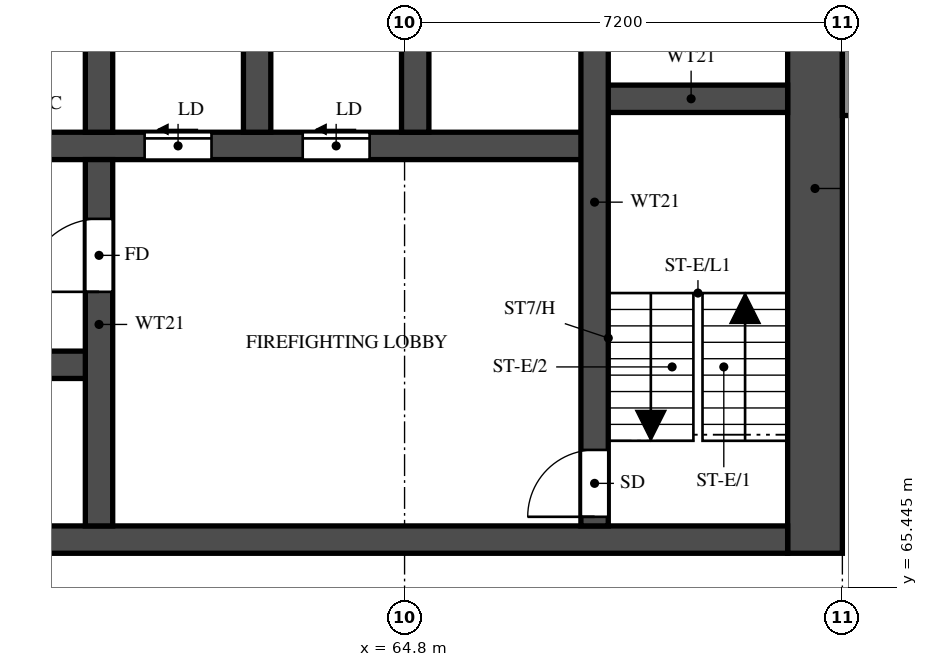
"""IFC4 building model, lengths in metres.
Left out: names, types, materials, properties, quantities, classifications, styles, units other than length and angle.
Written with IfcOpenShell. Run it as: python <this file> out.ifc"""

import sys

from ifc_helpers import new_model, si_unit, direction, frame, frame_2d, origin, place, context, subcontext, project, spatial, rectangle, extrude, element, fill, save


model = new_model("IFC4")
c1 = context("Model", 3, precision=1e-05, world=origin(), true_north=direction((0.0, 1.0)))
c2 = subcontext(c1, "Body", "Model", "MODEL_VIEW")
j1 = project(units=[si_unit("LENGTHUNIT", "METRE"), si_unit("PLANEANGLEUNIT", "RADIAN")], contexts=[c1])
p1 = place(None, origin())
s1 = spatial("IfcSite", under=j1, at=p1, CompositionType="ELEMENT")
p2 = place(p1, origin())
s2 = spatial("IfcBuilding", under=s1, at=p2, CompositionType="ELEMENT")
p3 = place(p2, frame((0.0, 0.0, 76.0)))
s3 = spatial("IfcBuildingStorey", under=s2, at=p3, CompositionType="ELEMENT", Elevation=76.0)
p4 = place(p3, frame((71.55, 66.0, 0.0), z_axis=(0.0, 0.0, 1.0), x_axis=(0.0, 1.0, 0.0)))
e1 = element("IfcWall", 1, at=p4, inside=s3, PredefinedType="SHEAR", context=c2, shape_type="SweptSolid", body=[
    extrude(rectangle(XDim=12.0, YDim=0.9, at=frame_2d((6.0, 0.0))), origin(), (0.0, 0.0, 1.0), 3.18),
])
p5 = place(p3, frame((29.7, 66.225, 0.0), z_axis=(0.0, 0.0, 1.0), x_axis=(1.0, 0.0, 0.0)))
e2 = element("IfcWall", 2, at=p5, inside=s3, PredefinedType="SHEAR", context=c2, shape_type="SweptSolid", body=[
    extrude(rectangle(XDim=41.4, YDim=0.45, at=frame_2d((20.7, 0.0))), origin(), (0.0, 0.0, 1.0), 3.18),
])
p6 = place(p5, frame((0.925, 0.0, 0.0)))
e3 = element("IfcOpeningElement", 3, at=p6, cuts=e2, PredefinedType="OPENING", context=c2, shape_type="SweptSolid", body=[
    extrude(rectangle(XDim=1.1, YDim=2.1, at=frame_2d((0.55, 1.05))), frame((0.0, 0.235, 0.0), z_axis=(0.0, -1.0, 0.0), x_axis=(1.0, 0.0, 0.0)), (0.0, 0.0, 1.0), 0.47),
])
p7 = place(p5, frame((3.738, 0.0, 0.0)))
e4 = element("IfcOpeningElement", 4, at=p7, cuts=e2, PredefinedType="OPENING", context=c2, shape_type="SweptSolid", body=[
    extrude(rectangle(XDim=1.8, YDim=2.1, at=frame_2d((0.9, 1.05))), frame((0.0, 0.235, 0.0), z_axis=(0.0, -1.0, 0.0), x_axis=(1.0, 0.0, 0.0)), (0.0, 0.0, 1.0), 0.47),
])
p8 = place(p3, frame((35.575, 69.1, 0.0), z_axis=(0.0, 0.0, 1.0), x_axis=(1.0, 0.0, 0.0)))
e5 = element("IfcWall", 5, at=p8, inside=s3, PredefinedType="SHEAR", context=c2, shape_type="SweptSolid", body=[
    extrude(rectangle(XDim=24.2, YDim=0.45, at=frame_2d((12.1, 0.0))), origin(), (0.0, 0.0, 1.0), 3.18),
])
p9 = place(p8, frame((1.05, 0.0, 0.0)))
e6 = element("IfcOpeningElement", 6, at=p9, cuts=e5, PredefinedType="OPENING", context=c2, shape_type="SweptSolid", body=[
    extrude(rectangle(XDim=1.1, YDim=2.1, at=frame_2d((0.55, 1.05))), frame((0.0, 0.235, 0.0), z_axis=(0.0, -1.0, 0.0), x_axis=(1.0, 0.0, 0.0)), (0.0, 0.0, 1.0), 0.47),
])
p10 = place(p8, frame((3.8, 0.0, 0.0)))
e7 = element("IfcOpeningElement", 7, at=p10, cuts=e5, PredefinedType="OPENING", context=c2, shape_type="SweptSolid", body=[
    extrude(rectangle(XDim=1.1, YDim=2.1, at=frame_2d((0.55, 1.05))), frame((0.0, 0.235, 0.0), z_axis=(0.0, -1.0, 0.0), x_axis=(1.0, 0.0, 0.0)), (0.0, 0.0, 1.0), 0.47),
])
p11 = place(p8, frame((6.55, 0.0, 0.0)))
e8 = element("IfcOpeningElement", 8, at=p11, cuts=e5, PredefinedType="OPENING", context=c2, shape_type="SweptSolid", body=[
    extrude(rectangle(XDim=1.1, YDim=2.1, at=frame_2d((0.55, 1.05))), frame((0.0, 0.235, 0.0), z_axis=(0.0, -1.0, 0.0), x_axis=(1.0, 0.0, 0.0)), (0.0, 0.0, 1.0), 0.47),
])
p12 = place(p8, frame((9.3, 0.0, 0.0)))
e9 = element("IfcOpeningElement", 9, at=p12, cuts=e5, PredefinedType="OPENING", context=c2, shape_type="SweptSolid", body=[
    extrude(rectangle(XDim=1.1, YDim=2.1, at=frame_2d((0.55, 1.05))), frame((0.0, 0.235, 0.0), z_axis=(0.0, -1.0, 0.0), x_axis=(1.0, 0.0, 0.0)), (0.0, 0.0, 1.0), 0.47),
])
p13 = place(p8, frame((12.05, 0.0, 0.0)))
e10 = element("IfcOpeningElement", 10, at=p13, cuts=e5, PredefinedType="OPENING", context=c2, shape_type="SweptSolid", body=[
    extrude(rectangle(XDim=1.1, YDim=2.1, at=frame_2d((0.55, 1.05))), frame((0.0, 0.235, 0.0), z_axis=(0.0, -1.0, 0.0), x_axis=(1.0, 0.0, 0.0)), (0.0, 0.0, 1.0), 0.47),
])
p14 = place(p8, frame((14.8, 0.0, 0.0)))
e11 = element("IfcOpeningElement", 11, at=p14, cuts=e5, PredefinedType="OPENING", context=c2, shape_type="SweptSolid", body=[
    extrude(rectangle(XDim=1.1, YDim=2.1, at=frame_2d((0.55, 1.05))), frame((0.0, 0.235, 0.0), z_axis=(0.0, -1.0, 0.0), x_axis=(1.0, 0.0, 0.0)), (0.0, 0.0, 1.0), 0.47),
])
p15 = place(p3, frame((32.875, 72.7, 0.0), z_axis=(0.0, 0.0, 1.0), x_axis=(1.0, 0.0, 0.0)))
e12 = element("IfcWall", 12, at=p15, inside=s3, PredefinedType="SHEAR", context=c2, shape_type="SweptSolid", body=[
    extrude(rectangle(XDim=35.05, YDim=0.45, at=frame_2d((17.525, 0.0))), origin(), (0.0, 0.0, 1.0), 3.18),
])
p16 = place(p15, frame((19.8, 0.0, 0.0)))
e13 = element("IfcOpeningElement", 13, at=p16, cuts=e12, PredefinedType="OPENING", context=c2, shape_type="SweptSolid", body=[
    extrude(rectangle(XDim=1.1, YDim=2.1, at=frame_2d((0.55, 1.05))), frame((0.0, 0.235, 0.0), z_axis=(0.0, -1.0, 0.0), x_axis=(1.0, 0.0, 0.0)), (0.0, 0.0, 1.0), 0.47),
])
p17 = place(p15, frame((27.65, 0.0, 0.0)))
e14 = element("IfcOpeningElement", 14, at=p17, cuts=e12, PredefinedType="OPENING", context=c2, shape_type="SweptSolid", body=[
    extrude(rectangle(XDim=1.1, YDim=2.1, at=frame_2d((0.55, 1.05))), frame((0.0, 0.235, 0.0), z_axis=(0.0, -1.0, 0.0), x_axis=(1.0, 0.0, 0.0)), (0.0, 0.0, 1.0), 0.47),
])
p18 = place(p15, frame((30.25, 0.0, 0.0)))
e15 = element("IfcOpeningElement", 15, at=p18, cuts=e12, PredefinedType="OPENING", context=c2, shape_type="SweptSolid", body=[
    extrude(rectangle(XDim=1.1, YDim=2.1, at=frame_2d((0.55, 1.05))), frame((0.0, 0.235, 0.0), z_axis=(0.0, -1.0, 0.0), x_axis=(1.0, 0.0, 0.0)), (0.0, 0.0, 1.0), 0.47),
])
p19 = place(p15, frame((3.75, 0.0, 0.0)))
e16 = element("IfcOpeningElement", 16, at=p19, cuts=e12, PredefinedType="OPENING", context=c2, shape_type="SweptSolid", body=[
    extrude(rectangle(XDim=1.1, YDim=2.1, at=frame_2d((0.55, 1.05))), frame((0.0, 0.235, 0.0), z_axis=(0.0, -1.0, 0.0), x_axis=(1.0, 0.0, 0.0)), (0.0, 0.0, 1.0), 0.47),
])
p20 = place(p15, frame((6.5, 0.0, 0.0)))
e17 = element("IfcOpeningElement", 17, at=p20, cuts=e12, PredefinedType="OPENING", context=c2, shape_type="SweptSolid", body=[
    extrude(rectangle(XDim=1.1, YDim=2.1, at=frame_2d((0.55, 1.05))), frame((0.0, 0.235, 0.0), z_axis=(0.0, -1.0, 0.0), x_axis=(1.0, 0.0, 0.0)), (0.0, 0.0, 1.0), 0.47),
])
p21 = place(p15, frame((9.25, 0.0, 0.0)))
e18 = element("IfcOpeningElement", 18, at=p21, cuts=e12, PredefinedType="OPENING", context=c2, shape_type="SweptSolid", body=[
    extrude(rectangle(XDim=1.1, YDim=2.1, at=frame_2d((0.55, 1.05))), frame((0.0, 0.235, 0.0), z_axis=(0.0, -1.0, 0.0), x_axis=(1.0, 0.0, 0.0)), (0.0, 0.0, 1.0), 0.47),
])
p22 = place(p15, frame((12.0, 0.0, 0.0)))
e19 = element("IfcOpeningElement", 19, at=p22, cuts=e12, PredefinedType="OPENING", context=c2, shape_type="SweptSolid", body=[
    extrude(rectangle(XDim=1.1, YDim=2.1, at=frame_2d((0.55, 1.05))), frame((0.0, 0.235, 0.0), z_axis=(0.0, -1.0, 0.0), x_axis=(1.0, 0.0, 0.0)), (0.0, 0.0, 1.0), 0.47),
])
p23 = place(p15, frame((14.75, 0.0, 0.0)))
e20 = element("IfcOpeningElement", 20, at=p23, cuts=e12, PredefinedType="OPENING", context=c2, shape_type="SweptSolid", body=[
    extrude(rectangle(XDim=1.1, YDim=2.1, at=frame_2d((0.55, 1.05))), frame((0.0, 0.235, 0.0), z_axis=(0.0, -1.0, 0.0), x_axis=(1.0, 0.0, 0.0)), (0.0, 0.0, 1.0), 0.47),
])
p24 = place(p15, frame((17.5, 0.0, 0.0)))
e21 = element("IfcOpeningElement", 21, at=p24, cuts=e12, PredefinedType="OPENING", context=c2, shape_type="SweptSolid", body=[
    extrude(rectangle(XDim=1.1, YDim=2.1, at=frame_2d((0.55, 1.05))), frame((0.0, 0.235, 0.0), z_axis=(0.0, -1.0, 0.0), x_axis=(1.0, 0.0, 0.0)), (0.0, 0.0, 1.0), 0.47),
])
p25 = place(p15, frame((0.913, 0.0, 0.0)))
e22 = element("IfcOpeningElement", 22, at=p25, cuts=e12, PredefinedType="OPENING", context=c2, shape_type="SweptSolid", body=[
    extrude(rectangle(XDim=1.1, YDim=2.1, at=frame_2d((0.55, 1.05))), frame((0.0, 0.235, 0.0), z_axis=(0.0, -1.0, 0.0), x_axis=(1.0, 0.0, 0.0)), (0.0, 0.0, 1.0), 0.47),
])
p26 = place(p3, frame((67.925, 73.475, 0.0), z_axis=(0.0, 0.0, 1.0), x_axis=(1.0, 0.0, 0.0)))
e23 = element("IfcWall", 23, at=p26, inside=s3, PredefinedType="SHEAR", context=c2, shape_type="SweptSolid", body=[
    extrude(rectangle(XDim=3.175, YDim=0.45, at=frame_2d((1.587, 0.0))), origin(), (0.0, 0.0, 1.0), 3.18),
])
p27 = place(p3, frame((67.925, 66.45, 0.0), z_axis=(0.0, 0.0, 1.0), x_axis=(0.0, 1.0, 0.0)))
e24 = element("IfcWall", 24, at=p27, inside=s3, PredefinedType="SHEAR", context=c2, shape_type="SweptSolid", body=[
    extrude(rectangle(XDim=10.65, YDim=0.45, at=frame_2d((5.325, 0.0))), origin(), (0.0, 0.0, 1.0), 3.18),
])
p28 = place(p27, frame((0.15, 0.0, 0.0)))
e25 = element("IfcOpeningElement", 25, at=p28, cuts=e24, PredefinedType="OPENING", context=c2, shape_type="SweptSolid", body=[
    extrude(rectangle(XDim=1.1, YDim=2.1, at=frame_2d((0.55, 1.05))), frame((0.0, 0.235, 0.0), z_axis=(0.0, -1.0, 0.0), x_axis=(1.0, 0.0, 0.0)), (0.0, 0.0, 1.0), 0.47),
])
p29 = place(p3, frame((59.775, 66.45, 0.0), z_axis=(0.0, 0.0, 1.0), x_axis=(0.0, 1.0, 0.0)))
e26 = element("IfcWall", 26, at=p29, inside=s3, PredefinedType="SHEAR", context=c2, shape_type="SweptSolid", body=[
    extrude(rectangle(XDim=6.025, YDim=0.45, at=frame_2d((3.013, 0.0))), origin(), (0.0, 0.0, 1.0), 3.18),
])
p30 = place(p29, frame((3.85, 0.0, 0.0)))
e27 = element("IfcOpeningElement", 27, at=p30, cuts=e26, PredefinedType="OPENING", context=c2, shape_type="SweptSolid", body=[
    extrude(rectangle(XDim=1.2, YDim=2.1, at=frame_2d((0.6, 1.05))), frame((0.0, 0.235, 0.0), z_axis=(0.0, -1.0, 0.0), x_axis=(1.0, 0.0, 0.0)), (0.0, 0.0, 1.0), 0.47),
])
for number, where, z_axis, x_axis in (
    (28, (59.775, 72.925, 0.0), (0.0, 0.0, 1.0), (0.0, 1.0, 0.0)),
    (29, (62.375, 72.925, 0.0), (0.0, 0.0, 1.0), (0.0, 1.0, 0.0)),
    (30, (64.975, 72.925, 0.0), (0.0, 0.0, 1.0), (0.0, 1.0, 0.0)),
):
    element("IfcWall", number, at=place(p3, frame(where, z_axis=z_axis, x_axis=x_axis)), inside=s3, PredefinedType="SHEAR", context=c2, shape_type="SweptSolid", body=[
        extrude(rectangle(XDim=2.95, YDim=0.45, at=frame_2d((1.475, 0.0))), origin(), (0.0, 0.0, 1.0), 3.18),
    ])
p31 = place(p3, frame((72.1, 73.2, 0.0), z_axis=(0.0, 0.0, 1.0), x_axis=(0.0, 1.0, 0.0)))
e31 = element("IfcWall", 31, at=p31, inside=s3, PredefinedType="SOLIDWALL", context=c2, shape_type="SweptSolid", body=[
    extrude(rectangle(XDim=4.8, YDim=0.2, at=frame_2d((2.4, 0.0))), origin(), (0.0, 0.0, 1.0), 3.18),
])
p32 = place(p28, origin())
e32 = element("IfcDoor", 32, at=p32, inside=s3, OperationType="SINGLE_SWING_LEFT", PredefinedType="DOOR", context=c2, shape_type="SweptSolid", body=[
    extrude(rectangle(XDim=1.1, YDim=2.1, at=frame_2d((0.55, 1.05))), frame((0.0, 0.025, 0.0), z_axis=(0.0, -1.0, 0.0), x_axis=(1.0, 0.0, 0.0)), (0.0, 0.0, 1.0), 0.05),
])
fill(e25, e32)
p33 = place(p30, origin())
e33 = element("IfcDoor", 33, at=p33, inside=s3, OperationType="SINGLE_SWING_RIGHT", PredefinedType="DOOR", context=c2, shape_type="SweptSolid", body=[
    extrude(rectangle(XDim=1.2, YDim=2.1, at=frame_2d((0.6, 1.05))), frame((0.0, 0.025, 0.0), z_axis=(0.0, -1.0, 0.0), x_axis=(1.0, 0.0, 0.0)), (0.0, 0.0, 1.0), 0.05),
])
fill(e27, e33)
p34 = place(p17, origin())
e34 = element("IfcDoor", 34, at=p34, inside=s3, OperationType="SLIDING_TO_LEFT", PredefinedType="DOOR", context=c2, shape_type="SweptSolid", body=[
    extrude(rectangle(XDim=1.1, YDim=2.1, at=frame_2d((0.55, 1.05))), frame((0.0, 0.025, 0.0), z_axis=(0.0, -1.0, 0.0), x_axis=(1.0, 0.0, 0.0)), (0.0, 0.0, 1.0), 0.05),
])
fill(e14, e34)
p35 = place(p18, origin())
e35 = element("IfcDoor", 35, at=p35, inside=s3, OperationType="SLIDING_TO_LEFT", PredefinedType="DOOR", context=c2, shape_type="SweptSolid", body=[
    extrude(rectangle(XDim=1.1, YDim=2.1, at=frame_2d((0.55, 1.05))), frame((0.0, 0.025, 0.0), z_axis=(0.0, -1.0, 0.0), x_axis=(1.0, 0.0, 0.0)), (0.0, 0.0, 1.0), 0.05),
])
fill(e15, e35)
save(model, sys.argv[1])
